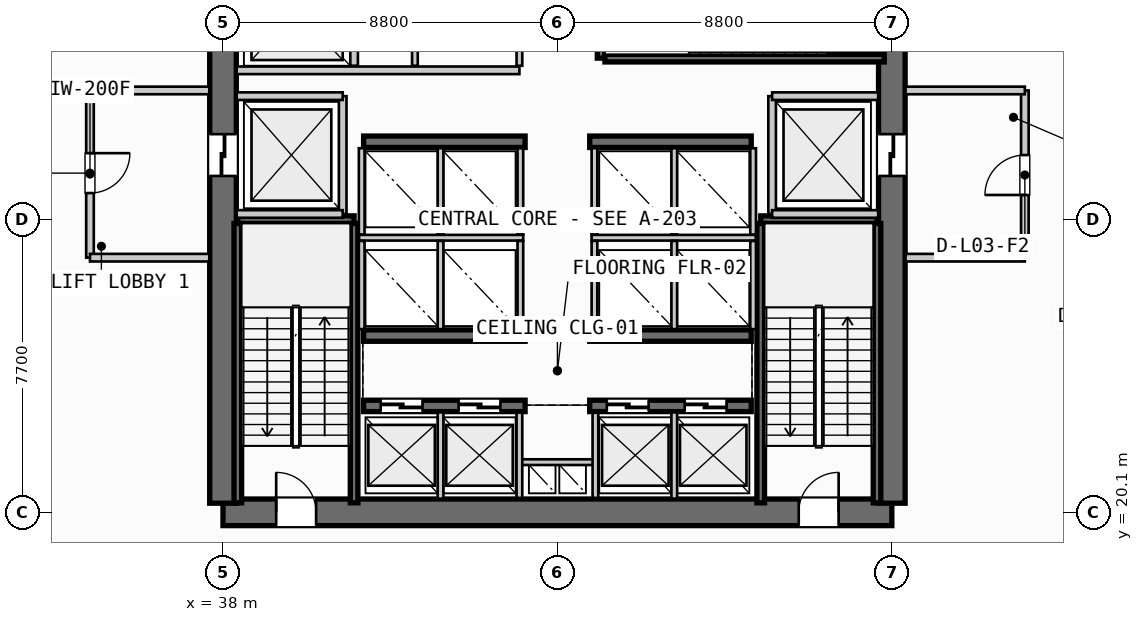
"""IFC4 building model, lengths in metres.
Left out: names, types, materials, properties, quantities, classifications, styles, units other than length and angle.
Written with IfcOpenShell. Run it as: python <this file> out.ifc"""

import sys

from ifc_helpers import new_model, si_unit, direction, frame, frame_2d, origin, place, context, subcontext, project, spatial, rectangle, extrude, source, transform, mapped, element, fill, save


model = new_model("IFC4")
c1 = context("Model", 3, precision=1e-05, world=origin(), true_north=direction((0.0, 1.0)))
c2 = subcontext(c1, "Body", "Model", "MODEL_VIEW")
j1 = project(units=[si_unit("LENGTHUNIT", "METRE"), si_unit("PLANEANGLEUNIT", "RADIAN")], contexts=[c1])
p1 = place(None, origin())
s1 = spatial("IfcSite", under=j1, at=p1, CompositionType="ELEMENT")
p2 = place(p1, origin())
s2 = spatial("IfcBuilding", under=s1, at=p2, CompositionType="ELEMENT")
p3 = place(p2, frame((0.0, 0.0, 14.8)))
s3 = spatial("IfcBuildingStorey", under=s2, at=p3, CompositionType="ELEMENT", Elevation=14.8)
p4 = place(p3, frame((38.0, 20.1, 0.0), z_axis=(0.0, 0.0, 1.0), x_axis=(1.0, 0.0, 0.0)))
e1 = element("IfcWall", 1, at=p4, inside=s3, PredefinedType="SHEAR", context=c2, shape_type="SweptSolid", body=[
    extrude(rectangle(XDim=17.6, YDim=0.7, at=frame_2d((8.8, 0.0))), origin(), (0.0, 0.0, 1.0), 4.53),
])
p5 = place(p4, frame((1.4, 0.0, 0.0)))
e2 = element("IfcOpeningElement", 2, at=p5, cuts=e1, PredefinedType="OPENING", context=c2, shape_type="SweptSolid", body=[
    extrude(rectangle(XDim=1.05, YDim=2.15, at=frame_2d((0.525, 1.075))), frame((0.0, 0.36, 0.0), z_axis=(0.0, -1.0, 0.0), x_axis=(1.0, 0.0, 0.0)), (0.0, 0.0, 1.0), 0.72),
])
p6 = place(p4, frame((15.15, 0.0, 0.0)))
e3 = element("IfcOpeningElement", 3, at=p6, cuts=e1, PredefinedType="OPENING", context=c2, shape_type="SweptSolid", body=[
    extrude(rectangle(XDim=1.05, YDim=2.15, at=frame_2d((0.525, 1.075))), frame((0.0, 0.36, 0.0), z_axis=(0.0, -1.0, 0.0), x_axis=(1.0, 0.0, 0.0)), (0.0, 0.0, 1.0), 0.72),
])
p7 = place(p3, frame((38.0, 35.26, 0.0), z_axis=(0.0, 0.0, 1.0), x_axis=(0.0, -1.0, 0.0)))
e4 = element("IfcWall", 4, at=p7, inside=s3, PredefinedType="SHEAR", context=c2, shape_type="SweptSolid", body=[
    extrude(rectangle(XDim=14.92, YDim=0.7, at=frame_2d((7.46, 0.0))), origin(), (0.0, 0.0, 1.0), 4.53),
])
p8 = place(p7, frame((5.21, 0.0, 0.0)))
e5 = element("IfcOpeningElement", 5, at=p8, cuts=e4, PredefinedType="OPENING", context=c2, shape_type="SweptSolid", body=[
    extrude(rectangle(XDim=1.1, YDim=2.2, at=frame_2d((0.55, 1.1))), frame((0.0, 0.36, 0.0), z_axis=(0.0, -1.0, 0.0), x_axis=(1.0, 0.0, 0.0)), (0.0, 0.0, 1.0), 0.72),
])
p9 = place(p3, frame((55.6, 20.34, 0.0), z_axis=(0.0, 0.0, 1.0), x_axis=(0.0, 1.0, 0.0)))
e6 = element("IfcWall", 6, at=p9, inside=s3, PredefinedType="SHEAR", context=c2, shape_type="SweptSolid", body=[
    extrude(rectangle(XDim=14.92, YDim=0.7, at=frame_2d((7.46, 0.0))), origin(), (0.0, 0.0, 1.0), 4.53),
])
p10 = place(p9, frame((12.71, 0.0, 0.0)))
e7 = element("IfcOpeningElement", 7, at=p10, cuts=e6, PredefinedType="OPENING", context=c2, shape_type="SweptSolid", body=[
    extrude(rectangle(XDim=1.05, YDim=2.15, at=frame_2d((0.525, 1.075))), frame((0.0, 0.36, 0.0), z_axis=(0.0, -1.0, 0.0), x_axis=(1.0, 0.0, 0.0)), (0.0, 0.0, 1.0), 0.72),
])
p11 = place(p9, frame((8.61, 0.0, 0.0)))
e8 = element("IfcOpeningElement", 8, at=p11, cuts=e6, PredefinedType="OPENING", context=c2, shape_type="SweptSolid", body=[
    extrude(rectangle(XDim=1.1, YDim=2.2, at=frame_2d((0.55, 1.1))), frame((0.0, 0.36, 0.0), z_axis=(0.0, -1.0, 0.0), x_axis=(1.0, 0.0, 0.0)), (0.0, 0.0, 1.0), 0.72),
])
p12 = place(p3, frame((41.7, 22.9, 0.0), z_axis=(0.0, 0.0, 1.0), x_axis=(1.0, 0.0, 0.0)))
e9 = element("IfcWall", 9, at=p12, inside=s3, PredefinedType="SHEAR", context=c2, shape_type="SweptSolid", body=[
    extrude(rectangle(XDim=4.25, YDim=0.3, at=frame_2d((2.125, 0.0))), origin(), (0.0, 0.0, 1.0), 4.53),
])
p13 = place(p12, frame((0.45, 0.0, 0.0)))
e10 = element("IfcOpeningElement", 10, at=p13, cuts=e9, PredefinedType="OPENING", context=c2, shape_type="SweptSolid", body=[
    extrude(rectangle(XDim=1.1, YDim=2.2, at=frame_2d((0.55, 1.1))), frame((0.0, 0.16, 0.0), z_axis=(0.0, -1.0, 0.0), x_axis=(1.0, 0.0, 0.0)), (0.0, 0.0, 1.0), 0.32),
])
p14 = place(p12, frame((2.5, 0.0, 0.0)))
e11 = element("IfcOpeningElement", 11, at=p14, cuts=e9, PredefinedType="OPENING", context=c2, shape_type="SweptSolid", body=[
    extrude(rectangle(XDim=1.1, YDim=2.2, at=frame_2d((0.55, 1.1))), frame((0.0, 0.16, 0.0), z_axis=(0.0, -1.0, 0.0), x_axis=(1.0, 0.0, 0.0)), (0.0, 0.0, 1.0), 0.32),
])
p15 = place(p3, frame((47.65, 22.9, 0.0), z_axis=(0.0, 0.0, 1.0), x_axis=(1.0, 0.0, 0.0)))
e12 = element("IfcWall", 12, at=p15, inside=s3, PredefinedType="SHEAR", context=c2, shape_type="SweptSolid", body=[
    extrude(rectangle(XDim=4.25, YDim=0.3, at=frame_2d((2.125, 0.0))), origin(), (0.0, 0.0, 1.0), 4.53),
])
p16 = place(p15, frame((0.45, 0.0, 0.0)))
e13 = element("IfcOpeningElement", 13, at=p16, cuts=e12, PredefinedType="OPENING", context=c2, shape_type="SweptSolid", body=[
    extrude(rectangle(XDim=1.1, YDim=2.2, at=frame_2d((0.55, 1.1))), frame((0.0, 0.16, 0.0), z_axis=(0.0, -1.0, 0.0), x_axis=(1.0, 0.0, 0.0)), (0.0, 0.0, 1.0), 0.32),
])
p17 = place(p15, frame((2.5, 0.0, 0.0)))
e14 = element("IfcOpeningElement", 14, at=p17, cuts=e12, PredefinedType="OPENING", context=c2, shape_type="SweptSolid", body=[
    extrude(rectangle(XDim=1.1, YDim=2.2, at=frame_2d((0.55, 1.1))), frame((0.0, 0.16, 0.0), z_axis=(0.0, -1.0, 0.0), x_axis=(1.0, 0.0, 0.0)), (0.0, 0.0, 1.0), 0.32),
])
for number, where, z_axis, x_axis in (
    (15, (41.7, 24.75, 0.0), (0.0, 0.0, 1.0), (1.0, 0.0, 0.0)),
    (16, (47.65, 24.75, 0.0), (0.0, 0.0, 1.0), (1.0, 0.0, 0.0)),
    (17, (41.7, 29.85, 0.0), (0.0, 0.0, 1.0), (1.0, 0.0, 0.0)),
    (18, (47.65, 29.85, 0.0), (0.0, 0.0, 1.0), (1.0, 0.0, 0.0)),
):
    element("IfcWall", number, at=place(p3, frame(where, z_axis=z_axis, x_axis=x_axis)), inside=s3, PredefinedType="SHEAR", context=c2, shape_type="SweptSolid", body=[
        extrude(rectangle(XDim=4.25, YDim=0.3, at=frame_2d((2.125, 0.0))), origin(), (0.0, 0.0, 1.0), 4.53),
    ])
p18 = place(p3, frame((38.39, 27.8, 0.0), z_axis=(0.0, 0.0, 1.0), x_axis=(1.0, 0.0, 0.0)))
e19 = element("IfcWall", 19, at=p18, inside=s3, PredefinedType="SHEAR", context=c2, shape_type="SweptSolid", body=[
    extrude(rectangle(XDim=3.06, YDim=0.2, at=frame_2d((1.53, 0.0))), origin(), (0.0, 0.0, 1.0), 4.53),
])
for number, where, z_axis, x_axis in (
    (20, (41.45, 27.7, 0.0), (0.0, 0.0, 1.0), (0.0, -1.0, 0.0)),
    (21, (38.39, 20.35, 0.0), (0.0, 0.0, 1.0), (0.0, 1.0, 0.0)),
):
    element("IfcWall", number, at=place(p3, frame(where, z_axis=z_axis, x_axis=x_axis)), inside=s3, PredefinedType="SHEAR", context=c2, shape_type="SweptSolid", body=[
        extrude(rectangle(XDim=7.35, YDim=0.2, at=frame_2d((3.675, 0.0))), origin(), (0.0, 0.0, 1.0), 4.53),
    ])
p19 = place(p3, frame((52.15, 27.8, 0.0), z_axis=(0.0, 0.0, 1.0), x_axis=(1.0, 0.0, 0.0)))
e22 = element("IfcWall", 22, at=p19, inside=s3, PredefinedType="SHEAR", context=c2, shape_type="SweptSolid", body=[
    extrude(rectangle(XDim=3.06, YDim=0.2, at=frame_2d((1.53, 0.0))), origin(), (0.0, 0.0, 1.0), 4.53),
])
for number, where, z_axis, x_axis in (
    (23, (55.21, 27.7, 0.0), (0.0, 0.0, 1.0), (0.0, -1.0, 0.0)),
    (24, (52.15, 20.35, 0.0), (0.0, 0.0, 1.0), (0.0, 1.0, 0.0)),
):
    element("IfcWall", number, at=place(p3, frame(where, z_axis=z_axis, x_axis=x_axis)), inside=s3, PredefinedType="SHEAR", context=c2, shape_type="SweptSolid", body=[
        extrude(rectangle(XDim=7.35, YDim=0.2, at=frame_2d((3.675, 0.0))), origin(), (0.0, 0.0, 1.0), 4.53),
    ])
p20 = place(p3, frame((47.95, 32.05, 0.0), z_axis=(0.0, 0.0, 1.0), x_axis=(0.0, 1.0, 0.0)))
e25 = element("IfcWall", 25, at=p20, inside=s3, PredefinedType="SHEAR", context=c2, shape_type="SweptSolid", body=[
    extrude(rectangle(XDim=3.06, YDim=0.2, at=frame_2d((1.53, 0.0))), origin(), (0.0, 0.0, 1.0), 4.53),
])
p21 = place(p3, frame((55.4, 32.05, 0.0), z_axis=(0.0, 0.0, 1.0), x_axis=(-1.0, 0.0, 0.0)))
e26 = element("IfcWall", 26, at=p21, inside=s3, PredefinedType="SHEAR", context=c2, shape_type="SweptSolid", body=[
    extrude(rectangle(XDim=7.35, YDim=0.2, at=frame_2d((3.675, 0.0))), origin(), (0.0, 0.0, 1.0), 4.53),
])
p22 = place(p3, frame((45.8, 21.42, 0.0), z_axis=(0.0, 0.0, 1.0), x_axis=(1.0, 0.0, 0.0)))
e27 = element("IfcWall", 27, at=p22, inside=s3, PredefinedType="PARTITIONING", context=c2, shape_type="SweptSolid", body=[
    extrude(rectangle(XDim=2.0, YDim=0.15, at=frame_2d((1.0, 0.0))), origin(), (0.0, 0.0, 1.0), 3.743),
])
for number, where, z_axis, x_axis in (
    (28, (45.8, 20.48, 0.0), (0.0, 0.0, 1.0), (0.0, 1.0, 0.0)),
    (29, (47.8, 20.48, 0.0), (0.0, 0.0, 1.0), (0.0, 1.0, 0.0)),
):
    element("IfcWall", number, at=place(p3, frame(where, z_axis=z_axis, x_axis=x_axis)), inside=s3, PredefinedType="PARTITIONING", context=c2, shape_type="SweptSolid", body=[
        extrude(rectangle(XDim=2.24, YDim=0.15, at=frame_2d((1.12, 0.0))), origin(), (0.0, 0.0, 1.0), 3.743),
    ])
p23 = place(p3, frame((41.15, 27.95, 0.0), z_axis=(0.0, 0.0, 1.0), x_axis=(0.0, 1.0, 0.0)))
e30 = element("IfcWall", 30, at=p23, inside=s3, PredefinedType="PARTITIONING", context=c2, shape_type="SweptSolid", body=[
    extrude(rectangle(XDim=3.1, YDim=0.2, at=frame_2d((1.55, 0.0))), origin(), (0.0, 0.0, 1.0), 3.743),
])
for number, where, z_axis, x_axis in (
    (31, (38.36, 27.95, 0.0), (0.0, 0.0, 1.0), (1.0, 0.0, 0.0)),
    (32, (38.36, 31.05, 0.0), (0.0, 0.0, 1.0), (1.0, 0.0, 0.0)),
):
    element("IfcWall", number, at=place(p3, frame(where, z_axis=z_axis, x_axis=x_axis)), inside=s3, PredefinedType="PARTITIONING", context=c2, shape_type="SweptSolid", body=[
        extrude(rectangle(XDim=2.79, YDim=0.2, at=frame_2d((1.395, 0.0))), origin(), (0.0, 0.0, 1.0), 3.743),
    ])
p24 = place(p3, frame((34.5, 31.2, 0.0), z_axis=(0.0, 0.0, 1.0), x_axis=(0.0, -1.0, 0.0)))
e33 = element("IfcWall", 33, at=p24, inside=s3, PredefinedType="PARTITIONING", context=c2, shape_type="SweptSolid", body=[
    extrude(rectangle(XDim=4.4, YDim=0.2, at=frame_2d((2.2, 0.0))), origin(), (0.0, 0.0, 1.0), 3.743),
])
p25 = place(p24, frame((1.65, 0.0, 0.0)))
e34 = element("IfcOpeningElement", 34, at=p25, cuts=e33, PredefinedType="OPENING", context=c2, shape_type="SweptSolid", body=[
    extrude(rectangle(XDim=1.05, YDim=2.15, at=frame_2d((0.525, 1.075))), frame((0.0, 0.11, 0.0), z_axis=(0.0, -1.0, 0.0), x_axis=(1.0, 0.0, 0.0)), (0.0, 0.0, 1.0), 0.22),
])
for number, where, z_axis, x_axis in (
    (35, (34.5, 26.8, 0.0), (0.0, 0.0, 1.0), (1.0, 0.0, 0.0)),
    (36, (34.5, 31.2, 0.0), (0.0, 0.0, 1.0), (1.0, 0.0, 0.0)),
):
    element("IfcWall", number, at=place(p3, frame(where, z_axis=z_axis, x_axis=x_axis)), inside=s3, PredefinedType="PARTITIONING", context=c2, shape_type="SweptSolid", body=[
        extrude(rectangle(XDim=3.14, YDim=0.2, at=frame_2d((1.57, 0.0))), origin(), (0.0, 0.0, 1.0), 3.743),
    ])
p26 = place(p3, frame((52.45, 27.95, 0.0), z_axis=(0.0, 0.0, 1.0), x_axis=(0.0, 1.0, 0.0)))
e37 = element("IfcWall", 37, at=p26, inside=s3, PredefinedType="PARTITIONING", context=c2, shape_type="SweptSolid", body=[
    extrude(rectangle(XDim=3.1, YDim=0.2, at=frame_2d((1.55, 0.0))), origin(), (0.0, 0.0, 1.0), 3.743),
])
for number, where, z_axis, x_axis in (
    (38, (52.45, 27.95, 0.0), (0.0, 0.0, 1.0), (1.0, 0.0, 0.0)),
    (39, (52.45, 31.05, 0.0), (0.0, 0.0, 1.0), (1.0, 0.0, 0.0)),
):
    element("IfcWall", number, at=place(p3, frame(where, z_axis=z_axis, x_axis=x_axis)), inside=s3, PredefinedType="PARTITIONING", context=c2, shape_type="SweptSolid", body=[
        extrude(rectangle(XDim=2.79, YDim=0.2, at=frame_2d((1.395, 0.0))), origin(), (0.0, 0.0, 1.0), 3.743),
    ])
p27 = place(p3, frame((59.1, 26.8, 0.0), z_axis=(0.0, 0.0, 1.0), x_axis=(0.0, 1.0, 0.0)))
e40 = element("IfcWall", 40, at=p27, inside=s3, PredefinedType="PARTITIONING", context=c2, shape_type="SweptSolid", body=[
    extrude(rectangle(XDim=4.4, YDim=0.2, at=frame_2d((2.2, 0.0))), origin(), (0.0, 0.0, 1.0), 3.743),
])
p28 = place(p27, frame((1.65, 0.0, 0.0)))
e41 = element("IfcOpeningElement", 41, at=p28, cuts=e40, PredefinedType="OPENING", context=c2, shape_type="SweptSolid", body=[
    extrude(rectangle(XDim=1.05, YDim=2.15, at=frame_2d((0.525, 1.075))), frame((0.0, 0.11, 0.0), z_axis=(0.0, -1.0, 0.0), x_axis=(1.0, 0.0, 0.0)), (0.0, 0.0, 1.0), 0.22),
])
for number, where, z_axis, x_axis in (
    (42, (55.96, 26.8, 0.0), (0.0, 0.0, 1.0), (1.0, 0.0, 0.0)),
    (43, (55.96, 31.2, 0.0), (0.0, 0.0, 1.0), (1.0, 0.0, 0.0)),
):
    element("IfcWall", number, at=place(p3, frame(where, z_axis=z_axis, x_axis=x_axis)), inside=s3, PredefinedType="PARTITIONING", context=c2, shape_type="SweptSolid", body=[
        extrude(rectangle(XDim=3.14, YDim=0.2, at=frame_2d((1.57, 0.0))), origin(), (0.0, 0.0, 1.0), 3.743),
    ])
for number, where, z_axis, x_axis in (
    (44, (43.725, 20.46, 0.0), (0.0, 0.0, 1.0), (0.0, 1.0, 0.0)),
    (45, (49.875, 20.46, 0.0), (0.0, 0.0, 1.0), (0.0, 1.0, 0.0)),
):
    element("IfcWall", number, at=place(p3, frame(where, z_axis=z_axis, x_axis=x_axis)), inside=s3, PredefinedType="PARTITIONING", context=c2, shape_type="SweptSolid", body=[
        extrude(rectangle(XDim=2.27, YDim=0.15, at=frame_2d((1.135, 0.0))), origin(), (0.0, 0.0, 1.0), 3.743),
    ])
p29 = place(p3, frame((41.58, 27.325, 0.0), z_axis=(0.0, 0.0, 1.0), x_axis=(1.0, 0.0, 0.0)))
e46 = element("IfcWall", 46, at=p29, inside=s3, PredefinedType="PARTITIONING", context=c2, shape_type="SweptSolid", body=[
    extrude(rectangle(XDim=4.32, YDim=0.15, at=frame_2d((2.16, 0.0))), origin(), (0.0, 0.0, 1.0), 3.743),
])
p30 = place(p3, frame((47.7, 27.325, 0.0), z_axis=(0.0, 0.0, 1.0), x_axis=(1.0, 0.0, 0.0)))
e47 = element("IfcWall", 47, at=p30, inside=s3, PredefinedType="PARTITIONING", context=c2, shape_type="SweptSolid", body=[
    extrude(rectangle(XDim=4.32, YDim=0.15, at=frame_2d((2.16, 0.0))), origin(), (0.0, 0.0, 1.0), 3.743),
])
for number, where, z_axis, x_axis in (
    (48, (41.65, 24.92, 0.0), (0.0, 0.0, 1.0), (0.0, 1.0, 0.0)),
    (49, (43.725, 24.92, 0.0), (0.0, 0.0, 1.0), (0.0, 1.0, 0.0)),
    (50, (45.825, 24.92, 0.0), (0.0, 0.0, 1.0), (0.0, 1.0, 0.0)),
    (51, (47.775, 24.92, 0.0), (0.0, 0.0, 1.0), (0.0, 1.0, 0.0)),
    (52, (49.875, 24.92, 0.0), (0.0, 0.0, 1.0), (0.0, 1.0, 0.0)),
    (53, (51.95, 24.92, 0.0), (0.0, 0.0, 1.0), (0.0, 1.0, 0.0)),
):
    element("IfcWall", number, at=place(p3, frame(where, z_axis=z_axis, x_axis=x_axis)), inside=s3, PredefinedType="PARTITIONING", context=c2, shape_type="SweptSolid", body=[
        extrude(rectangle(XDim=2.32, YDim=0.15, at=frame_2d((1.16, 0.0))), origin(), (0.0, 0.0, 1.0), 3.743),
    ])
for number, where, z_axis, x_axis in (
    (54, (41.65, 27.41, 0.0), (0.0, 0.0, 1.0), (0.0, 1.0, 0.0)),
    (55, (43.725, 27.41, 0.0), (0.0, 0.0, 1.0), (0.0, 1.0, 0.0)),
    (56, (45.825, 27.41, 0.0), (0.0, 0.0, 1.0), (0.0, 1.0, 0.0)),
    (57, (47.775, 27.41, 0.0), (0.0, 0.0, 1.0), (0.0, 1.0, 0.0)),
    (58, (49.875, 27.41, 0.0), (0.0, 0.0, 1.0), (0.0, 1.0, 0.0)),
    (59, (51.95, 27.41, 0.0), (0.0, 0.0, 1.0), (0.0, 1.0, 0.0)),
):
    element("IfcWall", number, at=place(p3, frame(where, z_axis=z_axis, x_axis=x_axis)), inside=s3, PredefinedType="PARTITIONING", context=c2, shape_type="SweptSolid", body=[
        extrude(rectangle(XDim=2.27, YDim=0.15, at=frame_2d((1.135, 0.0))), origin(), (0.0, 0.0, 1.0), 3.743),
    ])
p31 = place(p3, frame((41.45, 31.85, 0.0), z_axis=(0.0, 0.0, 1.0), x_axis=(0.0, 1.0, 0.0)))
e60 = element("IfcWall", 60, at=p31, inside=s3, PredefinedType="PARTITIONING", context=c2, shape_type="SweptSolid", body=[
    extrude(rectangle(XDim=3.29, YDim=0.2, at=frame_2d((1.645, 0.0))), origin(), (0.0, 0.0, 1.0), 3.743),
])
p32 = place(p3, frame((38.36, 31.73, 0.0), z_axis=(0.0, 0.0, 1.0), x_axis=(1.0, 0.0, 0.0)))
e61 = element("IfcWall", 61, at=p32, inside=s3, PredefinedType="PARTITIONING", context=c2, shape_type="SweptSolid", body=[
    extrude(rectangle(XDim=7.44, YDim=0.2, at=frame_2d((3.72, 0.0))), origin(), (0.0, 0.0, 1.0), 3.743),
])
p33 = place(p3, frame((45.8, 31.85, 0.0), z_axis=(0.0, 0.0, 1.0), x_axis=(0.0, 1.0, 0.0)))
e62 = element("IfcWall", 62, at=p33, inside=s3, PredefinedType="PARTITIONING", context=c2, shape_type="SweptSolid", body=[
    extrude(rectangle(XDim=3.29, YDim=0.15, at=frame_2d((1.645, 0.0))), origin(), (0.0, 0.0, 1.0), 3.743),
])
p34 = place(p3, frame((43.05, 31.85, 0.0), z_axis=(0.0, 0.0, 1.0), x_axis=(0.0, 1.0, 0.0)))
e63 = element("IfcWall", 63, at=p34, inside=s3, PredefinedType="PLUMBINGWALL", context=c2, shape_type="SweptSolid", body=[
    extrude(rectangle(XDim=3.29, YDim=0.15, at=frame_2d((1.645, 0.0))), origin(), (0.0, 0.0, 1.0), 3.743),
])
m1 = source(origin(), c2, "Body", "SweptSolid", [
    extrude(rectangle(XDim=1.05, YDim=2.15, at=frame_2d((0.525, 1.075))), frame((0.0, 0.025, 0.0), z_axis=(0.0, -1.0, 0.0), x_axis=(1.0, 0.0, 0.0)), (0.0, 0.0, 1.0), 0.05),
])
p35 = place(p5, origin())
e64 = element("IfcDoor", 64, at=p35, inside=s3, OperationType="SINGLE_SWING_LEFT", PredefinedType="DOOR", context=c2, shape_type="MappedRepresentation", body=[
    mapped(m1, transform((0.0, 0.0, 0.0), scale=1.0)),
])
fill(e2, e64)
p36 = place(p6, origin())
e65 = element("IfcDoor", 65, at=p36, inside=s3, OperationType="SINGLE_SWING_RIGHT", PredefinedType="DOOR", context=c2, shape_type="MappedRepresentation", body=[
    mapped(m1, transform((0.0, 0.0, 0.0), scale=1.0)),
])
fill(e3, e65)
m2 = source(origin(), c2, "Body", "SweptSolid", [
    extrude(rectangle(XDim=1.1, YDim=2.2, at=frame_2d((0.55, 1.1))), frame((0.0, 0.025, 0.0), z_axis=(0.0, -1.0, 0.0), x_axis=(1.0, 0.0, 0.0)), (0.0, 0.0, 1.0), 0.05),
])
p37 = place(p8, origin())
e66 = element("IfcDoor", 66, at=p37, inside=s3, OperationType="SLIDING_TO_LEFT", PredefinedType="DOOR", context=c2, shape_type="MappedRepresentation", body=[
    mapped(m2, transform((0.0, 0.0, 0.0), scale=1.0)),
])
fill(e5, e66)
p38 = place(p11, origin())
e67 = element("IfcDoor", 67, at=p38, inside=s3, OperationType="SLIDING_TO_RIGHT", PredefinedType="DOOR", context=c2, shape_type="MappedRepresentation", body=[
    mapped(m2, transform((0.0, 0.0, 0.0), scale=1.0)),
])
fill(e8, e67)
p39 = place(p13, origin())
e68 = element("IfcDoor", 68, at=p39, inside=s3, OperationType="SLIDING_TO_LEFT", PredefinedType="DOOR", context=c2, shape_type="MappedRepresentation", body=[
    mapped(m2, transform((0.0, 0.0, 0.0), scale=1.0)),
])
fill(e10, e68)
p40 = place(p14, origin())
e69 = element("IfcDoor", 69, at=p40, inside=s3, OperationType="SLIDING_TO_LEFT", PredefinedType="DOOR", context=c2, shape_type="MappedRepresentation", body=[
    mapped(m2, transform((0.0, 0.0, 0.0), scale=1.0)),
])
fill(e11, e69)
p41 = place(p16, origin())
e70 = element("IfcDoor", 70, at=p41, inside=s3, OperationType="SLIDING_TO_LEFT", PredefinedType="DOOR", context=c2, shape_type="MappedRepresentation", body=[
    mapped(m2, transform((0.0, 0.0, 0.0), scale=1.0)),
])
fill(e13, e70)
p42 = place(p17, origin())
e71 = element("IfcDoor", 71, at=p42, inside=s3, OperationType="SLIDING_TO_LEFT", PredefinedType="DOOR", context=c2, shape_type="MappedRepresentation", body=[
    mapped(m2, transform((0.0, 0.0, 0.0), scale=1.0)),
])
fill(e14, e71)
p43 = place(p25, origin())
e72 = element("IfcDoor", 72, at=p43, inside=s3, OperationType="SINGLE_SWING_LEFT", PredefinedType="DOOR", context=c2, shape_type="MappedRepresentation", body=[
    mapped(m1, transform((0.0, 0.0, 0.0), scale=1.0)),
])
fill(e34, e72)
p44 = place(p28, origin())
e73 = element("IfcDoor", 73, at=p44, inside=s3, OperationType="SINGLE_SWING_LEFT", PredefinedType="DOOR", context=c2, shape_type="MappedRepresentation", body=[
    mapped(m1, transform((0.0, 0.0, 0.0), scale=1.0)),
])
fill(e41, e73)
save(model, sys.argv[1])
